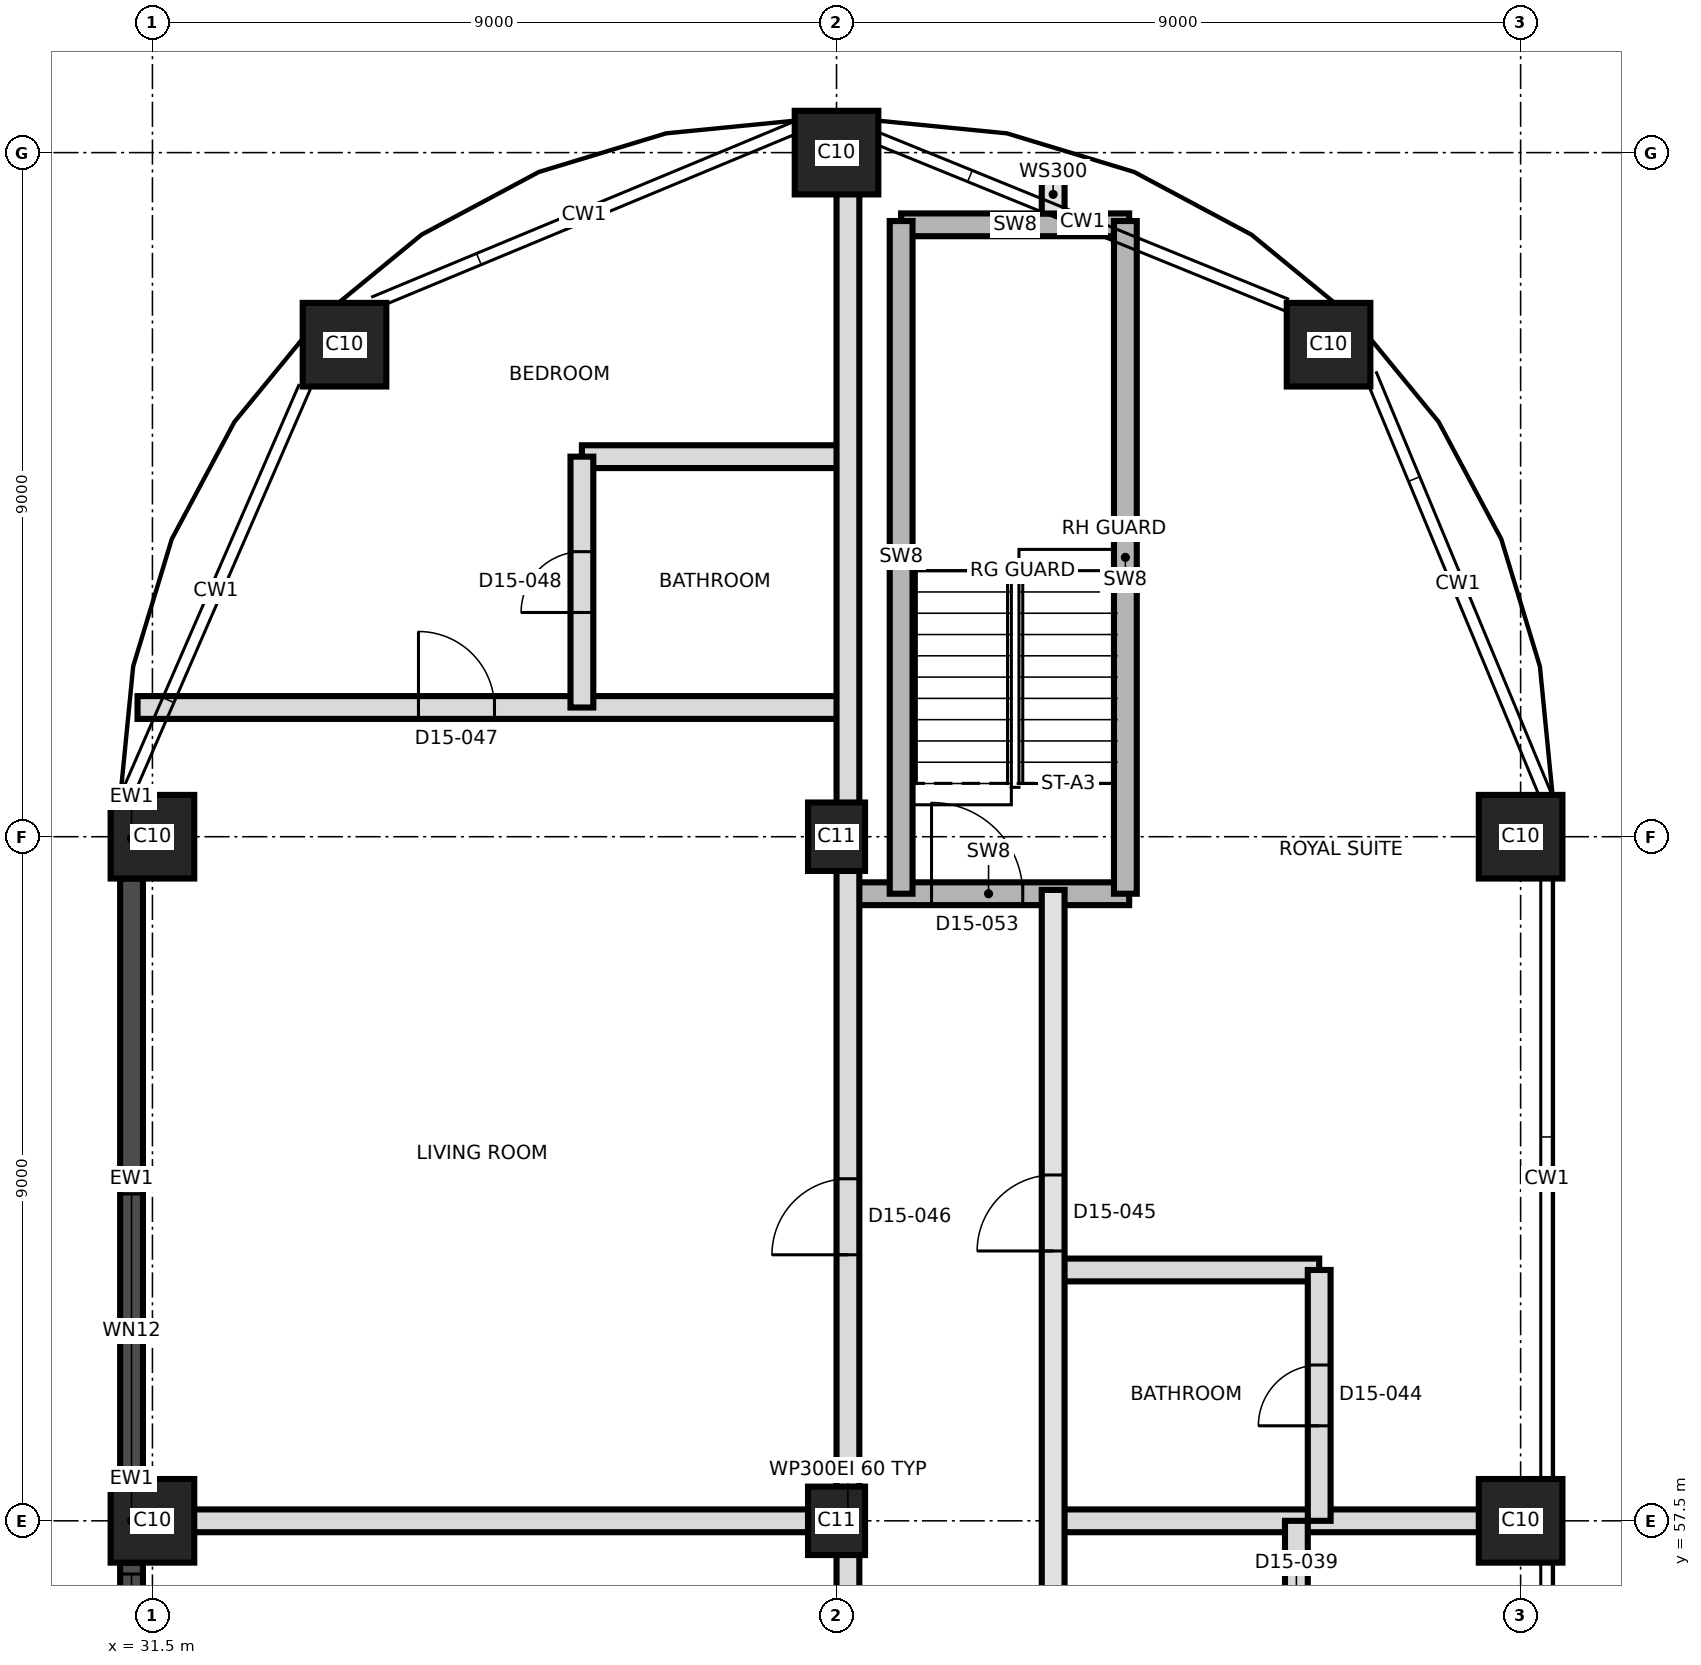
"""IFC4 building model, lengths in metres.
Left out: names, types, materials, properties, quantities, classifications, styles, units other than length and angle.
Written with IfcOpenShell. Run it as: python <this file> out.ifc"""

import sys

from ifc_helpers import new_model, si_unit, direction, frame, frame_2d, origin, origin_2d, place, context, subcontext, project, spatial, rectangle, extrude, element, fill, save


model = new_model("IFC4")
c1 = context("Model", 3, precision=1e-05, world=origin(), true_north=direction((0.0, 1.0)))
c2 = subcontext(c1, "Body", "Model", "MODEL_VIEW")
j1 = project(units=[si_unit("LENGTHUNIT", "METRE"), si_unit("PLANEANGLEUNIT", "RADIAN")], contexts=[c1])
p1 = place(None, origin())
s1 = spatial("IfcSite", under=j1, at=p1, CompositionType="ELEMENT")
p2 = place(p1, origin())
s2 = spatial("IfcBuilding", under=s1, at=p2, CompositionType="ELEMENT")
p3 = place(p2, frame((0.0, 0.0, 157.0)))
s3 = spatial("IfcBuildingStorey", under=s2, at=p3, CompositionType="ELEMENT", Elevation=157.0)
p4 = place(p3, frame((31.5, 57.5, 0.0), z_axis=(0.0, 0.0, 1.0), x_axis=(1.0, 0.0, 0.0)))
e1 = element("IfcColumn", 1, at=p4, inside=s3, PredefinedType="COLUMN", context=c2, shape_type="SweptSolid", body=[
    extrude(rectangle(XDim=1.1, YDim=1.1, at=origin_2d()), origin(), (0.0, 0.0, 1.0), 3.7),
])
p5 = place(p3, frame((40.5, 57.5, 0.0), z_axis=(0.0, 0.0, 1.0), x_axis=(0.0, 1.0, 0.0)))
e2 = element("IfcColumn", 2, at=p5, inside=s3, PredefinedType="COLUMN", context=c2, shape_type="SweptSolid", body=[
    extrude(rectangle(XDim=0.9, YDim=0.75, at=origin_2d()), origin(), (0.0, 0.0, 1.0), 3.7),
])
for number, where, z_axis, x_axis in (
    (3, (49.5, 57.5, 0.0), (0.0, 0.0, 1.0), (1.0, 0.0, 0.0)),
    (4, (31.5, 66.5, 0.0), (0.0, 0.0, 1.0), (1.0, 0.0, 0.0)),
):
    element("IfcColumn", number, at=place(p3, frame(where, z_axis=z_axis, x_axis=x_axis)), inside=s3, PredefinedType="COLUMN", context=c2, shape_type="SweptSolid", body=[
        extrude(rectangle(XDim=1.1, YDim=1.1, at=origin_2d()), origin(), (0.0, 0.0, 1.0), 3.7),
    ])
p6 = place(p3, frame((40.5, 66.5, 0.0), z_axis=(0.0, 0.0, 1.0), x_axis=(0.0, 1.0, 0.0)))
e5 = element("IfcColumn", 5, at=p6, inside=s3, PredefinedType="COLUMN", context=c2, shape_type="SweptSolid", body=[
    extrude(rectangle(XDim=0.9, YDim=0.75, at=origin_2d()), origin(), (0.0, 0.0, 1.0), 3.7),
])
for number, where, z_axis, x_axis in (
    (6, (49.5, 66.5, 0.0), (0.0, 0.0, 1.0), (1.0, 0.0, 0.0)),
    (7, (34.027, 72.973, 0.0), (0.0, 0.0, 1.0), (1.0, 0.0, 0.0)),
    (8, (46.973, 72.973, 0.0), (0.0, 0.0, 1.0), (1.0, 0.0, 0.0)),
    (9, (40.5, 75.5, 0.0), (0.0, 0.0, 1.0), (1.0, 0.0, 0.0)),
):
    element("IfcColumn", number, at=place(p3, frame(where, z_axis=z_axis, x_axis=x_axis)), inside=s3, PredefinedType="COLUMN", context=c2, shape_type="SweptSolid", body=[
        extrude(rectangle(XDim=1.1, YDim=1.1, at=origin_2d()), origin(), (0.0, 0.0, 1.0), 3.7),
    ])
p7 = place(p3, frame((31.225, 66.992, 0.0), z_axis=(0.0, 0.0, 1.0), x_axis=(0.0, -1.0, 0.0)))
e10 = element("IfcWall", 10, at=p7, inside=s3, PredefinedType="SOLIDWALL", context=c2, shape_type="SweptSolid", body=[
    extrude(rectangle(XDim=1.042, YDim=0.3, at=frame_2d((0.521, 0.0))), origin(), (0.0, 0.0, 1.0), 3.4),
])
p8 = place(p3, frame((31.225, 65.95, 0.0), z_axis=(0.0, 0.0, 1.0), x_axis=(0.0, -1.0, 0.0)))
e11 = element("IfcWall", 11, at=p8, inside=s3, PredefinedType="SOLIDWALL", context=c2, shape_type="SweptSolid", body=[
    extrude(rectangle(XDim=7.9, YDim=0.3, at=frame_2d((3.95, 0.0))), origin(), (0.0, 0.0, 1.0), 2.8),
])
p9 = place(p8, frame((4.15, 0.0, 0.9)))
e12 = element("IfcOpeningElement", 12, at=p9, cuts=e11, PredefinedType="OPENING", context=c2, shape_type="SweptSolid", body=[
    extrude(rectangle(XDim=3.6, YDim=1.5, at=frame_2d((1.8, 0.75))), frame((0.0, 0.16, 0.0), z_axis=(0.0, -1.0, 0.0), x_axis=(1.0, 0.0, 0.0)), (0.0, 0.0, 1.0), 0.32),
])
p10 = place(p3, frame((31.225, 58.05, 0.0), z_axis=(0.0, 0.0, 1.0), x_axis=(0.0, -1.0, 0.0)))
e13 = element("IfcWall", 13, at=p10, inside=s3, PredefinedType="SOLIDWALL", context=c2, shape_type="SweptSolid", body=[
    extrude(rectangle(XDim=1.1, YDim=0.3, at=frame_2d((0.55, 0.0))), origin(), (0.0, 0.0, 1.0), 3.4),
])
p11 = place(p3, frame((31.225, 56.95, 0.0), z_axis=(0.0, 0.0, 1.0), x_axis=(0.0, -1.0, 0.0)))
e14 = element("IfcWall", 14, at=p11, inside=s3, PredefinedType="SOLIDWALL", context=c2, shape_type="SweptSolid", body=[
    extrude(rectangle(XDim=7.9, YDim=0.3, at=frame_2d((3.95, 0.0))), origin(), (0.0, 0.0, 1.0), 2.8),
])
p12 = place(p11, frame((0.15, 0.0, 0.9)))
e15 = element("IfcOpeningElement", 15, at=p12, cuts=e14, PredefinedType="OPENING", context=c2, shape_type="SweptSolid", body=[
    extrude(rectangle(XDim=3.6, YDim=1.5, at=frame_2d((1.8, 0.75))), frame((0.0, 0.16, 0.0), z_axis=(0.0, -1.0, 0.0), x_axis=(1.0, 0.0, 0.0)), (0.0, 0.0, 1.0), 0.32),
])
p13 = place(p11, frame((4.15, 0.0, 0.9)))
e16 = element("IfcOpeningElement", 16, at=p13, cuts=e14, PredefinedType="OPENING", context=c2, shape_type="SweptSolid", body=[
    extrude(rectangle(XDim=3.6, YDim=1.5, at=frame_2d((1.8, 0.75))), frame((0.0, 0.16, 0.0), z_axis=(0.0, -1.0, 0.0), x_axis=(1.0, 0.0, 0.0)), (0.0, 0.0, 1.0), 0.32),
])
p14 = place(p3, frame((31.425, 57.5, 0.0), z_axis=(0.0, 0.0, 1.0), x_axis=(1.0, 0.0, 0.0)))
e17 = element("IfcWall", 17, at=p14, inside=s3, PredefinedType="PARTITIONING", context=c2, shape_type="SweptSolid", body=[
    extrude(rectangle(XDim=9.225, YDim=0.3, at=frame_2d((4.612, 0.0))), origin(), (0.0, 0.0, 1.0), 3.4),
])
p15 = place(p3, frame((43.35, 57.5, 0.0), z_axis=(0.0, 0.0, 1.0), x_axis=(1.0, 0.0, 0.0)))
e18 = element("IfcWall", 18, at=p15, inside=s3, PredefinedType="PARTITIONING", context=c2, shape_type="SweptSolid", body=[
    extrude(rectangle(XDim=6.225, YDim=0.3, at=frame_2d((3.112, 0.0))), origin(), (0.0, 0.0, 1.0), 3.4),
])
p16 = place(p3, frame((43.35, 60.8, 0.0), z_axis=(0.0, 0.0, 1.0), x_axis=(1.0, 0.0, 0.0)))
e19 = element("IfcWall", 19, at=p16, inside=s3, PredefinedType="PARTITIONING", context=c2, shape_type="SweptSolid", body=[
    extrude(rectangle(XDim=3.5, YDim=0.3, at=frame_2d((1.75, 0.0))), origin(), (0.0, 0.0, 1.0), 3.4),
])
p17 = place(p3, frame((40.65, 65.75, 0.0), z_axis=(0.0, 0.0, 1.0), x_axis=(1.0, 0.0, 0.0)))
e20 = element("IfcWall", 20, at=p17, inside=s3, PredefinedType="SHEAR", context=c2, shape_type="SweptSolid", body=[
    extrude(rectangle(XDim=3.7, YDim=0.3, at=frame_2d((1.85, 0.0))), origin(), (0.0, 0.0, 1.0), 3.4),
])
p18 = place(p17, frame((1.1, 0.0, 0.0)))
e21 = element("IfcOpeningElement", 21, at=p18, cuts=e20, PredefinedType="OPENING", context=c2, shape_type="SweptSolid", body=[
    extrude(rectangle(XDim=1.2, YDim=2.1, at=frame_2d((0.6, 1.05))), frame((0.0, 0.16, 0.0), z_axis=(0.0, -1.0, 0.0), x_axis=(1.0, 0.0, 0.0)), (0.0, 0.0, 1.0), 0.32),
])
p19 = place(p3, frame((31.304, 68.2, 0.0), z_axis=(0.0, 0.0, 1.0), x_axis=(1.0, 0.0, 0.0)))
e22 = element("IfcWall", 22, at=p19, inside=s3, PredefinedType="PARTITIONING", context=c2, shape_type="SweptSolid", body=[
    extrude(rectangle(XDim=9.346, YDim=0.3, at=frame_2d((4.673, 0.0))), origin(), (0.0, 0.0, 1.0), 3.4),
])
p20 = place(p19, frame((3.696, 0.0, 0.0)))
e23 = element("IfcOpeningElement", 23, at=p20, cuts=e22, PredefinedType="OPENING", context=c2, shape_type="SweptSolid", body=[
    extrude(rectangle(XDim=1.0, YDim=2.1, at=frame_2d((0.5, 1.05))), frame((0.0, 0.16, 0.0), z_axis=(0.0, -1.0, 0.0), x_axis=(1.0, 0.0, 0.0)), (0.0, 0.0, 1.0), 0.32),
])
p21 = place(p3, frame((37.15, 71.5, 0.0), z_axis=(0.0, 0.0, 1.0), x_axis=(1.0, 0.0, 0.0)))
e24 = element("IfcWall", 24, at=p21, inside=s3, PredefinedType="PARTITIONING", context=c2, shape_type="SweptSolid", body=[
    extrude(rectangle(XDim=3.5, YDim=0.3, at=frame_2d((1.75, 0.0))), origin(), (0.0, 0.0, 1.0), 3.4),
])
p22 = place(p3, frame((41.35, 74.55, 0.0), z_axis=(0.0, 0.0, 1.0), x_axis=(1.0, 0.0, 0.0)))
e25 = element("IfcWall", 25, at=p22, inside=s3, PredefinedType="SHEAR", context=c2, shape_type="SweptSolid", body=[
    extrude(rectangle(XDim=3.0, YDim=0.3, at=frame_2d((1.5, 0.0))), origin(), (0.0, 0.0, 1.0), 3.4),
])
p23 = place(p3, frame((37.15, 68.2, 0.0), z_axis=(0.0, 0.0, 1.0), x_axis=(0.0, 1.0, 0.0)))
e26 = element("IfcWall", 26, at=p23, inside=s3, PredefinedType="PARTITIONING", context=c2, shape_type="SweptSolid", body=[
    extrude(rectangle(XDim=3.3, YDim=0.3, at=frame_2d((1.65, 0.0))), origin(), (0.0, 0.0, 1.0), 3.4),
])
p24 = place(p23, frame((1.25, 0.0, 0.0)))
e27 = element("IfcOpeningElement", 27, at=p24, cuts=e26, PredefinedType="OPENING", context=c2, shape_type="SweptSolid", body=[
    extrude(rectangle(XDim=0.8, YDim=2.1, at=frame_2d((0.4, 1.05))), frame((0.0, 0.16, 0.0), z_axis=(0.0, -1.0, 0.0), x_axis=(1.0, 0.0, 0.0)), (0.0, 0.0, 1.0), 0.32),
])
p25 = place(p3, frame((40.65, 39.65, 0.0), z_axis=(0.0, 0.0, 1.0), x_axis=(0.0, 1.0, 0.0)))
e28 = element("IfcWall", 28, at=p25, inside=s3, PredefinedType="PARTITIONING", context=c2, shape_type="SweptSolid", body=[
    extrude(rectangle(XDim=35.925, YDim=0.3, at=frame_2d((17.962, 0.0))), origin(), (0.0, 0.0, 1.0), 3.4),
])
p26 = place(p25, frame((1.55, 0.0, 0.0)))
e29 = element("IfcOpeningElement", 29, at=p26, cuts=e28, PredefinedType="OPENING", context=c2, shape_type="SweptSolid", body=[
    extrude(rectangle(XDim=1.2, YDim=2.1, at=frame_2d((0.6, 1.05))), frame((0.0, 0.16, 0.0), z_axis=(0.0, -1.0, 0.0), x_axis=(1.0, 0.0, 0.0)), (0.0, 0.0, 1.0), 0.32),
])
p27 = place(p25, frame((4.8, 0.0, 0.0)))
e30 = element("IfcOpeningElement", 30, at=p27, cuts=e28, PredefinedType="OPENING", context=c2, shape_type="SweptSolid", body=[
    extrude(rectangle(XDim=1.0, YDim=2.1, at=frame_2d((0.5, 1.05))), frame((0.0, 0.16, 0.0), z_axis=(0.0, -1.0, 0.0), x_axis=(1.0, 0.0, 0.0)), (0.0, 0.0, 1.0), 0.32),
])
p28 = place(p25, frame((12.265, 0.0, 0.0)))
e31 = element("IfcOpeningElement", 31, at=p28, cuts=e28, PredefinedType="OPENING", context=c2, shape_type="SweptSolid", body=[
    extrude(rectangle(XDim=1.0, YDim=2.1, at=frame_2d((0.5, 1.05))), frame((0.0, 0.16, 0.0), z_axis=(0.0, -1.0, 0.0), x_axis=(1.0, 0.0, 0.0)), (0.0, 0.0, 1.0), 0.32),
])
p29 = place(p25, frame((15.215, 0.0, 0.0)))
e32 = element("IfcOpeningElement", 32, at=p29, cuts=e28, PredefinedType="OPENING", context=c2, shape_type="SweptSolid", body=[
    extrude(rectangle(XDim=1.4, YDim=2.1, at=frame_2d((0.7, 1.05))), frame((0.0, 0.16, 0.0), z_axis=(0.0, -1.0, 0.0), x_axis=(1.0, 0.0, 0.0)), (0.0, 0.0, 1.0), 0.32),
])
p30 = place(p25, frame((21.35, 0.0, 0.0)))
e33 = element("IfcOpeningElement", 33, at=p30, cuts=e28, PredefinedType="OPENING", context=c2, shape_type="SweptSolid", body=[
    extrude(rectangle(XDim=1.0, YDim=2.4, at=frame_2d((0.5, 1.2))), frame((0.0, 0.16, 0.0), z_axis=(0.0, -1.0, 0.0), x_axis=(1.0, 0.0, 0.0)), (0.0, 0.0, 1.0), 0.32),
])
p31 = place(p3, frame((41.35, 65.75, 0.0), z_axis=(0.0, 0.0, 1.0), x_axis=(0.0, 1.0, 0.0)))
e34 = element("IfcWall", 34, at=p31, inside=s3, PredefinedType="SHEAR", context=c2, shape_type="SweptSolid", body=[
    extrude(rectangle(XDim=8.85, YDim=0.3, at=frame_2d((4.425, 0.0))), origin(), (0.0, 0.0, 1.0), 3.4),
])
p32 = place(p3, frame((43.35, 39.65, 0.0), z_axis=(0.0, 0.0, 1.0), x_axis=(0.0, 1.0, 0.0)))
e35 = element("IfcWall", 35, at=p32, inside=s3, PredefinedType="SOLIDWALL", context=c2, shape_type="SweptSolid", body=[
    extrude(rectangle(XDim=26.15, YDim=0.3, at=frame_2d((13.075, 0.0))), origin(), (0.0, 0.0, 1.0), 3.4),
])
p33 = place(p32, frame((3.1, 0.0, 0.0)))
e36 = element("IfcOpeningElement", 36, at=p33, cuts=e35, PredefinedType="OPENING", context=c2, shape_type="SweptSolid", body=[
    extrude(rectangle(XDim=1.0, YDim=2.1, at=frame_2d((0.5, 1.05))), frame((0.0, 0.16, 0.0), z_axis=(0.0, -1.0, 0.0), x_axis=(1.0, 0.0, 0.0)), (0.0, 0.0, 1.0), 0.32),
])
p34 = place(p32, frame((4.75, 0.0, 0.0)))
e37 = element("IfcOpeningElement", 37, at=p34, cuts=e35, PredefinedType="OPENING", context=c2, shape_type="SweptSolid", body=[
    extrude(rectangle(XDim=1.0, YDim=2.1, at=frame_2d((0.5, 1.05))), frame((0.0, 0.16, 0.0), z_axis=(0.0, -1.0, 0.0), x_axis=(1.0, 0.0, 0.0)), (0.0, 0.0, 1.0), 0.32),
])
p35 = place(p32, frame((9.985, 0.0, 0.0)))
e38 = element("IfcOpeningElement", 38, at=p35, cuts=e35, PredefinedType="OPENING", context=c2, shape_type="SweptSolid", body=[
    extrude(rectangle(XDim=1.2, YDim=2.1, at=frame_2d((0.6, 1.05))), frame((0.0, 0.16, 0.0), z_axis=(0.0, -1.0, 0.0), x_axis=(1.0, 0.0, 0.0)), (0.0, 0.0, 1.0), 0.32),
])
p36 = place(p32, frame((13.235, 0.0, 0.0)))
e39 = element("IfcOpeningElement", 39, at=p36, cuts=e35, PredefinedType="OPENING", context=c2, shape_type="SweptSolid", body=[
    extrude(rectangle(XDim=1.0, YDim=2.1, at=frame_2d((0.5, 1.05))), frame((0.0, 0.16, 0.0), z_axis=(0.0, -1.0, 0.0), x_axis=(1.0, 0.0, 0.0)), (0.0, 0.0, 1.0), 0.32),
])
p37 = place(p32, frame((21.4, 0.0, 0.0)))
e40 = element("IfcOpeningElement", 40, at=p37, cuts=e35, PredefinedType="OPENING", context=c2, shape_type="SweptSolid", body=[
    extrude(rectangle(XDim=1.0, YDim=2.4, at=frame_2d((0.5, 1.2))), frame((0.0, 0.16, 0.0), z_axis=(0.0, -1.0, 0.0), x_axis=(1.0, 0.0, 0.0)), (0.0, 0.0, 1.0), 0.32),
])
p38 = place(p3, frame((43.35, 74.699, 0.0), z_axis=(0.0, 0.0, 1.0), x_axis=(0.0, 1.0, 0.0)))
e41 = element("IfcWall", 41, at=p38, inside=s3, PredefinedType="SOLIDWALL", context=c2, shape_type="SweptSolid", body=[
    extrude(rectangle(XDim=0.504, YDim=0.3, at=frame_2d((0.252, 0.0))), origin(), (0.0, 0.0, 1.0), 3.4),
])
p39 = place(p3, frame((44.3, 65.75, 0.0), z_axis=(0.0, 0.0, 1.0), x_axis=(0.0, 1.0, 0.0)))
e42 = element("IfcWall", 42, at=p39, inside=s3, PredefinedType="SHEAR", context=c2, shape_type="SweptSolid", body=[
    extrude(rectangle(XDim=8.85, YDim=0.3, at=frame_2d((4.425, 0.0))), origin(), (0.0, 0.0, 1.0), 3.4),
])
p40 = place(p3, frame((46.55, 54.8, 0.0), z_axis=(0.0, 0.0, 1.0), x_axis=(0.0, 1.0, 0.0)))
e43 = element("IfcWall", 43, at=p40, inside=s3, PredefinedType="PARTITIONING", context=c2, shape_type="SweptSolid", body=[
    extrude(rectangle(XDim=2.7, YDim=0.3, at=frame_2d((1.35, 0.0))), origin(), (0.0, 0.0, 1.0), 3.4),
])
p41 = place(p40, frame((0.95, 0.0, 0.0)))
e44 = element("IfcOpeningElement", 44, at=p41, cuts=e43, PredefinedType="OPENING", context=c2, shape_type="SweptSolid", body=[
    extrude(rectangle(XDim=0.8, YDim=2.1, at=frame_2d((0.4, 1.05))), frame((0.0, 0.16, 0.0), z_axis=(0.0, -1.0, 0.0), x_axis=(1.0, 0.0, 0.0)), (0.0, 0.0, 1.0), 0.32),
])
p42 = place(p3, frame((46.85, 57.5, 0.0), z_axis=(0.0, 0.0, 1.0), x_axis=(0.0, 1.0, 0.0)))
e45 = element("IfcWall", 45, at=p42, inside=s3, PredefinedType="PARTITIONING", context=c2, shape_type="SweptSolid", body=[
    extrude(rectangle(XDim=3.3, YDim=0.3, at=frame_2d((1.65, 0.0))), origin(), (0.0, 0.0, 1.0), 3.4),
])
p43 = place(p42, frame((1.25, 0.0, 0.0)))
e46 = element("IfcOpeningElement", 46, at=p43, cuts=e45, PredefinedType="OPENING", context=c2, shape_type="SweptSolid", body=[
    extrude(rectangle(XDim=0.8, YDim=2.1, at=frame_2d((0.4, 1.05))), frame((0.0, 0.16, 0.0), z_axis=(0.0, -1.0, 0.0), x_axis=(1.0, 0.0, 0.0)), (0.0, 0.0, 1.0), 0.32),
])
p44 = place(p9, origin())
e47 = element("IfcWindow", 47, at=p44, inside=s3, PartitioningType="SINGLE_PANEL", PredefinedType="WINDOW", context=c2, shape_type="SweptSolid", body=[
    extrude(rectangle(XDim=3.6, YDim=1.5, at=frame_2d((1.8, 0.75))), frame((0.0, 0.03, 0.0), z_axis=(0.0, -1.0, 0.0), x_axis=(1.0, 0.0, 0.0)), (0.0, 0.0, 1.0), 0.06),
])
fill(e12, e47)
p45 = place(p12, origin())
e48 = element("IfcWindow", 48, at=p45, inside=s3, PartitioningType="SINGLE_PANEL", PredefinedType="WINDOW", context=c2, shape_type="SweptSolid", body=[
    extrude(rectangle(XDim=3.6, YDim=1.5, at=frame_2d((1.8, 0.75))), frame((0.0, 0.03, 0.0), z_axis=(0.0, -1.0, 0.0), x_axis=(1.0, 0.0, 0.0)), (0.0, 0.0, 1.0), 0.06),
])
fill(e15, e48)
p46 = place(p43, origin())
e49 = element("IfcDoor", 49, at=p46, inside=s3, OperationType="SINGLE_SWING_LEFT", PredefinedType="DOOR", context=c2, shape_type="SweptSolid", body=[
    extrude(rectangle(XDim=0.8, YDim=2.1, at=frame_2d((0.4, 1.05))), frame((0.0, 0.025, 0.0), z_axis=(0.0, -1.0, 0.0), x_axis=(1.0, 0.0, 0.0)), (0.0, 0.0, 1.0), 0.05),
])
fill(e46, e49)
p47 = place(p37, origin())
e50 = element("IfcDoor", 50, at=p47, inside=s3, OperationType="SINGLE_SWING_LEFT", PredefinedType="DOOR", context=c2, shape_type="SweptSolid", body=[
    extrude(rectangle(XDim=1.0, YDim=2.4, at=frame_2d((0.5, 1.2))), frame((0.0, 0.025, 0.0), z_axis=(0.0, -1.0, 0.0), x_axis=(1.0, 0.0, 0.0)), (0.0, 0.0, 1.0), 0.05),
])
fill(e40, e50)
p48 = place(p30, origin())
e51 = element("IfcDoor", 51, at=p48, inside=s3, OperationType="SINGLE_SWING_RIGHT", PredefinedType="DOOR", context=c2, shape_type="SweptSolid", body=[
    extrude(rectangle(XDim=1.0, YDim=2.4, at=frame_2d((0.5, 1.2))), frame((0.0, 0.025, 0.0), z_axis=(0.0, -1.0, 0.0), x_axis=(1.0, 0.0, 0.0)), (0.0, 0.0, 1.0), 0.05),
])
fill(e33, e51)
p49 = place(p20, origin())
e52 = element("IfcDoor", 52, at=p49, inside=s3, OperationType="SINGLE_SWING_LEFT", PredefinedType="DOOR", context=c2, shape_type="SweptSolid", body=[
    extrude(rectangle(XDim=1.0, YDim=2.1, at=frame_2d((0.5, 1.05))), frame((0.0, 0.025, 0.0), z_axis=(0.0, -1.0, 0.0), x_axis=(1.0, 0.0, 0.0)), (0.0, 0.0, 1.0), 0.05),
])
fill(e23, e52)
p50 = place(p24, origin())
e53 = element("IfcDoor", 53, at=p50, inside=s3, OperationType="SINGLE_SWING_LEFT", PredefinedType="DOOR", context=c2, shape_type="SweptSolid", body=[
    extrude(rectangle(XDim=0.8, YDim=2.1, at=frame_2d((0.4, 1.05))), frame((0.0, 0.025, 0.0), z_axis=(0.0, -1.0, 0.0), x_axis=(1.0, 0.0, 0.0)), (0.0, 0.0, 1.0), 0.05),
])
fill(e27, e53)
p51 = place(p18, origin())
e54 = element("IfcDoor", 54, at=p51, inside=s3, OperationType="SINGLE_SWING_RIGHT", PredefinedType="DOOR", context=c2, shape_type="SweptSolid", body=[
    extrude(rectangle(XDim=1.2, YDim=2.1, at=frame_2d((0.6, 1.05))), frame((0.0, 0.025, 0.0), z_axis=(0.0, -1.0, 0.0), x_axis=(1.0, 0.0, 0.0)), (0.0, 0.0, 1.0), 0.05),
])
fill(e21, e54)
save(model, sys.argv[1])
